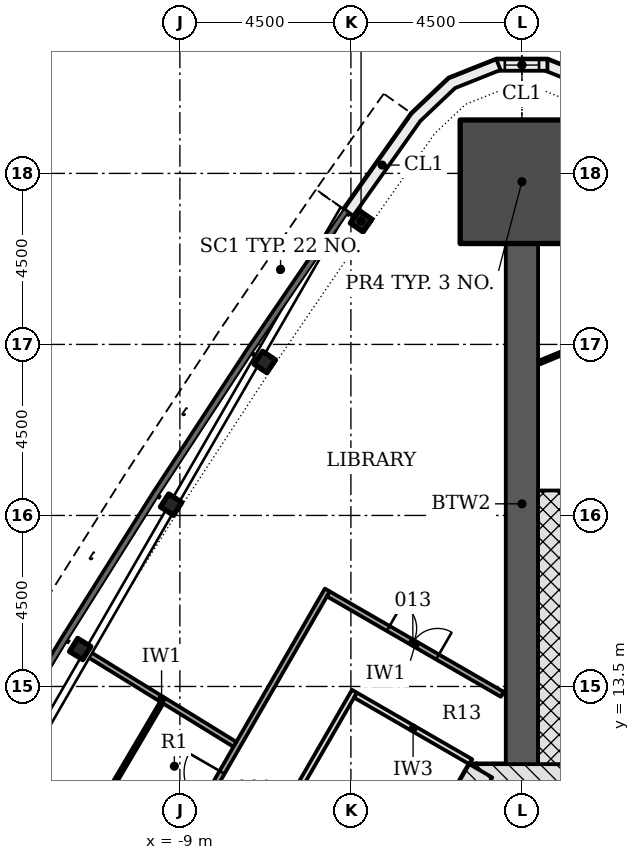
"""IFC4 building model, lengths in metres.
Left out: names, types, materials, properties, quantities, classifications, styles, units other than length and angle.
Written with IfcOpenShell. Run it as: python <this file> out.ifc"""

import sys

from ifc_helpers import new_model, si_unit, direction, frame, frame_2d, origin, origin_2d, place, context, subcontext, project, spatial, polyline, rectangle, i_section, outline, extrude, element, fill, save


model = new_model("IFC4")
c1 = context("Model", 3, precision=1e-05, world=origin(), true_north=direction((0.0, 1.0)))
c2 = subcontext(c1, "Body", "Model", "MODEL_VIEW")
j1 = project(units=[si_unit("LENGTHUNIT", "METRE"), si_unit("PLANEANGLEUNIT", "RADIAN")], contexts=[c1])
p1 = place(None, origin())
s1 = spatial("IfcSite", under=j1, at=p1, CompositionType="ELEMENT")
p2 = place(p1, origin())
s2 = spatial("IfcBuilding", under=s1, at=p2, CompositionType="ELEMENT")
p3 = place(p2, frame((0.0, 0.0, 58.2)))
s3 = spatial("IfcBuildingStorey", under=s2, at=p3, CompositionType="ELEMENT", Elevation=58.2)
p4 = place(p3, frame((10.311, -4.703, -0.2), z_axis=(0.0, 0.0, 1.0), x_axis=(-0.500001446645, 0.866024568562, 0.0)))
e1 = element("IfcWall", 1, at=p4, inside=s3, PredefinedType="SHEAR", context=c2, shape_type="SweptSolid", body=[
    extrude(rectangle(XDim=18.458, YDim=0.7, at=frame_2d((9.229, 0.0))), origin(), (0.0, 0.0, 1.0), 3.6),
])
p5 = place(p4, frame((7.5, 0.0, 0.2)))
e2 = element("IfcOpeningElement", 2, at=p5, cuts=e1, PredefinedType="OPENING", context=c2, shape_type="SweptSolid", body=[
    extrude(rectangle(XDim=1.0, YDim=2.1, at=frame_2d((0.5, 1.05))), frame((0.0, 0.36, 0.0), z_axis=(0.0, -1.0, 0.0), x_axis=(1.0, 0.0, 0.0)), (0.0, 0.0, 1.0), 0.72),
])
p6 = place(p4, frame((1.852, 0.0, 0.2)))
e3 = element("IfcOpeningElement", 3, at=p6, cuts=e1, PredefinedType="OPENING", context=c2, shape_type="SweptSolid", body=[
    extrude(rectangle(XDim=0.9, YDim=2.1, at=frame_2d((0.45, 1.05))), frame((0.0, 0.36, 0.0), z_axis=(0.0, -1.0, 0.0), x_axis=(1.0, 0.0, 0.0)), (0.0, 0.0, 1.0), 0.72),
])
p7 = place(p4, frame((5.238, 0.0, 0.2)))
e4 = element("IfcOpeningElement", 4, at=p7, cuts=e1, PredefinedType="OPENING", context=c2, shape_type="SweptSolid", body=[
    extrude(rectangle(XDim=1.0, YDim=2.1, at=frame_2d((0.5, 1.05))), frame((0.0, 0.36, 0.0), z_axis=(0.0, -1.0, 0.0), x_axis=(1.0, 0.0, 0.0)), (0.0, 0.0, 1.0), 0.72),
])
p8 = place(p4, frame((13.63, 0.0, 0.2)))
e5 = element("IfcOpeningElement", 5, at=p8, cuts=e1, PredefinedType="OPENING", context=c2, shape_type="SweptSolid", body=[
    extrude(rectangle(XDim=0.9, YDim=2.1, at=frame_2d((0.45, 1.05))), frame((0.0, 0.36, 0.0), z_axis=(0.0, -1.0, 0.0), x_axis=(1.0, 0.0, 0.0)), (0.0, 0.0, 1.0), 0.72),
])
p9 = place(p3, frame((1.386, 11.106, -0.2), z_axis=(0.0, 0.0, 1.0), x_axis=(-1.0, 0.0, 0.0)))
e6 = element("IfcWall", 6, at=p9, inside=s3, PredefinedType="SHEAR", context=c2, shape_type="SweptSolid", body=[
    extrude(rectangle(XDim=2.771, YDim=0.7, at=frame_2d((1.386, 0.0))), origin(), (0.0, 0.0, 1.0), 3.6),
])
p10 = place(p3, frame((-1.083, 11.281, -0.2), z_axis=(0.0, 0.0, 1.0), x_axis=(-0.500001446645, -0.866024568562, 0.0)))
e7 = element("IfcWall", 7, at=p10, inside=s3, PredefinedType="SHEAR", context=c2, shape_type="SweptSolid", body=[
    extrude(rectangle(XDim=18.458, YDim=0.7, at=frame_2d((9.229, 0.0))), origin(), (0.0, 0.0, 1.0), 3.6),
])
p11 = place(p10, frame((8.979, 0.0, 0.2)))
e8 = element("IfcOpeningElement", 8, at=p11, cuts=e7, PredefinedType="OPENING", context=c2, shape_type="SweptSolid", body=[
    extrude(rectangle(XDim=1.2, YDim=2.1, at=frame_2d((0.6, 1.05))), frame((0.0, 0.36, 0.0), z_axis=(0.0, -1.0, 0.0), x_axis=(1.0, 0.0, 0.0)), (0.0, 0.0, 1.0), 0.72),
])
p12 = place(p10, frame((11.029, 0.0, 0.2)))
e9 = element("IfcOpeningElement", 9, at=p12, cuts=e7, PredefinedType="OPENING", context=c2, shape_type="SweptSolid", body=[
    extrude(rectangle(XDim=1.2, YDim=2.1, at=frame_2d((0.6, 1.05))), frame((0.0, 0.36, 0.0), z_axis=(0.0, -1.0, 0.0), x_axis=(1.0, 0.0, 0.0)), (0.0, 0.0, 1.0), 0.72),
])
p13 = place(p3, frame((0.0, 11.456, -0.2), z_axis=(0.0, 0.0, 1.0), x_axis=(0.0, 1.0, 0.0)))
e10 = element("IfcWall", 10, at=p13, inside=s3, PredefinedType="SHEAR", context=c2, shape_type="SweptSolid", body=[
    extrude(rectangle(XDim=13.699, YDim=0.85, at=frame_2d((6.849, 0.0))), origin(), (0.0, 0.0, 1.0), 3.6),
])
p14 = place(p3, frame((0.0, 26.78, -0.2), z_axis=(0.0, 0.0, 1.0), x_axis=(0.0, 1.0, 0.0)))
e11 = element("IfcColumn", 11, at=p14, inside=s3, PredefinedType="COLUMN", context=c2, shape_type="SweptSolid", body=[
    extrude(rectangle(XDim=3.25, YDim=3.25, at=origin_2d()), origin(), (0.0, 0.0, 1.0), 3.6),
])
for number, where, z_axis, x_axis in (
    (12, (-4.233, 25.743, -0.2), (0.0, 0.0, 1.0), (-0.572, -0.82, 0.0)),
    (13, (-6.768, 22.038, -0.2), (0.0, 0.0, 1.0), (-0.557, -0.831, 0.0)),
    (14, (-9.231, 18.285, -0.2), (0.0, 0.0, 1.0), (-0.541, -0.841, 0.0)),
    (15, (-11.623, 14.485, -0.2), (0.0, 0.0, 1.0), (-0.525, -0.851, 0.0)),
):
    element("IfcColumn", number, at=place(p3, frame(where, z_axis=z_axis, x_axis=x_axis)), inside=s3, PredefinedType="COLUMN", context=c2, shape_type="SweptSolid", body=[
        extrude(i_section(OverallWidth=0.404, OverallDepth=0.406, WebThickness=0.027, FlangeThickness=0.044, FilletRadius=0.015, at=origin_2d()), origin(), (0.0, 0.0, 1.0), 3.6),
    ])
p15 = place(p3, origin())
e16 = element("IfcWall", 16, at=p15, inside=s3, PredefinedType="NOTDEFINED", context=c2, shape_type="SweptSolid", body=[
    extrude(outline(polyline([(4.684, 26.058), (2.901, 28.576), (1.924, 29.502), (0.673, 30.001), (0.562, 29.722), (1.759, 29.245), (2.673, 28.379), (4.439, 25.885), (4.684, 26.058)])), origin(), (0.0, 0.0, 1.0), 3.3),
])
p16 = place(p3, frame((-0.671, 29.851, 0.0), z_axis=(0.0, 0.0, 1.0), x_axis=(1.0, 0.0, 0.0)))
e17 = element("IfcWall", 17, at=p16, inside=s3, PredefinedType="NOTDEFINED", context=c2, shape_type="SweptSolid", body=[
    extrude(rectangle(XDim=1.342, YDim=0.3, at=frame_2d((0.671, 0.0))), origin(), (0.0, 0.0, 1.0), 3.3),
])
p17 = place(p16, frame((0.221, 0.0, 0.6)))
e18 = element("IfcOpeningElement", 18, at=p17, cuts=e17, PredefinedType="OPENING", context=c2, shape_type="SweptSolid", body=[
    extrude(rectangle(XDim=0.9, YDim=2.4, at=frame_2d((0.45, 1.2))), frame((0.0, 0.16, 0.0), z_axis=(0.0, -1.0, 0.0), x_axis=(1.0, 0.0, 0.0)), (0.0, 0.0, 1.0), 0.32),
])
p18 = place(p3, origin())
e19 = element("IfcWall", 19, at=p18, inside=s3, PredefinedType="NOTDEFINED", context=c2, shape_type="SweptSolid", body=[
    extrude(outline(polyline([(-0.673, 30.001), (-1.924, 29.502), (-2.901, 28.576), (-4.684, 26.058), (-4.439, 25.885), (-2.673, 28.379), (-1.759, 29.245), (-0.562, 29.722), (-0.673, 30.001)])), origin(), (0.0, 0.0, 1.0), 3.3),
])
p19 = place(p3, frame((1.005, 11.456, -0.2), z_axis=(0.0, 0.0, 1.0), x_axis=(0.0, 1.0, 0.0)))
e20 = element("IfcWall", 20, at=p19, inside=s3, PredefinedType="SHEAR", context=c2, shape_type="SweptSolid", body=[
    extrude(rectangle(XDim=7.2, YDim=1.161, at=frame_2d((3.6, 0.0))), origin(), (0.0, 0.0, 1.0), 3.6),
])
p20 = place(p3, frame((-16.169, -3.099, 0.0), z_axis=(0.0, 0.0, 1.0), x_axis=(0.499999805269, 0.866025516212, 0.0)))
e21 = element("IfcWall", 21, at=p20, inside=s3, PredefinedType="PARTITIONING", context=c2, shape_type="SweptSolid", body=[
    extrude(rectangle(XDim=22.097, YDim=0.15, at=frame_2d((11.049, 0.0))), origin(), (0.0, 0.0, 1.0), 2.778),
])
p21 = place(p20, frame((15.558, 0.0, 0.0)))
e22 = element("IfcOpeningElement", 22, at=p21, cuts=e21, PredefinedType="OPENING", context=c2, shape_type="SweptSolid", body=[
    extrude(rectangle(XDim=1.0, YDim=2.1, at=frame_2d((0.5, 1.05))), frame((0.0, 0.085, 0.0), z_axis=(0.0, -1.0, 0.0), x_axis=(1.0, 0.0, 0.0)), (0.0, 0.0, 1.0), 0.17),
])
p22 = place(p20, frame((12.976, 0.0, 0.0)))
e23 = element("IfcOpeningElement", 23, at=p22, cuts=e21, PredefinedType="OPENING", context=c2, shape_type="SweptSolid", body=[
    extrude(rectangle(XDim=1.0, YDim=2.1, at=frame_2d((0.5, 1.05))), frame((0.0, 0.085, 0.0), z_axis=(0.0, -1.0, 0.0), x_axis=(1.0, 0.0, 0.0)), (0.0, 0.0, 1.0), 0.17),
])
p23 = place(p20, frame((9.635, 0.0, 0.0)))
e24 = element("IfcOpeningElement", 24, at=p23, cuts=e21, PredefinedType="OPENING", context=c2, shape_type="SweptSolid", body=[
    extrude(rectangle(XDim=1.5, YDim=2.1, at=frame_2d((0.75, 1.05))), frame((0.0, 0.085, 0.0), z_axis=(0.0, -1.0, 0.0), x_axis=(1.0, 0.0, 0.0)), (0.0, 0.0, 1.0), 0.17),
])
p24 = place(p20, frame((3.404, 0.0, 0.0)))
e25 = element("IfcOpeningElement", 25, at=p24, cuts=e21, PredefinedType="OPENING", context=c2, shape_type="SweptSolid", body=[
    extrude(rectangle(XDim=1.5, YDim=2.1, at=frame_2d((0.75, 1.05))), frame((0.0, 0.085, 0.0), z_axis=(0.0, -1.0, 0.0), x_axis=(1.0, 0.0, 0.0)), (0.0, 0.0, 1.0), 0.17),
])
p25 = place(p3, frame((-4.407, 13.374, 0.0), z_axis=(0.0, 0.0, 1.0), x_axis=(-0.499997181693, -0.866027030928, 0.0)))
e26 = element("IfcWall", 26, at=p25, inside=s3, PredefinedType="PARTITIONING", context=c2, shape_type="SweptSolid", body=[
    extrude(rectangle(XDim=16.77, YDim=0.15, at=frame_2d((8.385, 0.0))), origin(), (0.0, 0.0, 1.0), 2.778),
])
p26 = place(p25, frame((8.879, 0.0, 0.0)))
e27 = element("IfcOpeningElement", 27, at=p26, cuts=e26, PredefinedType="OPENING", context=c2, shape_type="SweptSolid", body=[
    extrude(rectangle(XDim=1.0, YDim=2.1, at=frame_2d((0.5, 1.05))), frame((0.0, 0.085, 0.0), z_axis=(0.0, -1.0, 0.0), x_axis=(1.0, 0.0, 0.0)), (0.0, 0.0, 1.0), 0.17),
])
p27 = place(p3, frame((-5.093, 15.935, 0.0), z_axis=(0.0, 0.0, 1.0), x_axis=(0.866033195618, -0.499986503906, 0.0)))
e28 = element("IfcWall", 28, at=p27, inside=s3, PredefinedType="PARTITIONING", context=c2, shape_type="SweptSolid", body=[
    extrude(rectangle(XDim=5.282, YDim=0.15, at=frame_2d((2.641, 0.0))), origin(), (0.0, 0.0, 1.0), 3.4),
])
p28 = place(p27, frame((1.816, 0.0, 0.0)))
e29 = element("IfcOpeningElement", 29, at=p28, cuts=e28, PredefinedType="OPENING", context=c2, shape_type="SweptSolid", body=[
    extrude(rectangle(XDim=1.5, YDim=2.1, at=frame_2d((0.75, 1.05))), frame((0.0, 0.085, 0.0), z_axis=(0.0, -1.0, 0.0), x_axis=(1.0, 0.0, 0.0)), (0.0, 0.0, 1.0), 0.17),
])
p29 = place(p3, frame((-4.379, 13.271, 0.0), z_axis=(0.0, 0.0, 1.0), x_axis=(0.866019471182, -0.500010275428, 0.0)))
e30 = element("IfcWall", 30, at=p29, inside=s3, PredefinedType="PARTITIONING", context=c2, shape_type="SweptSolid", body=[
    extrude(rectangle(XDim=3.5, YDim=0.15, at=frame_2d((1.75, 0.0))), origin(), (0.0, 0.0, 1.0), 3.4),
])
p30 = place(p3, frame((-11.41, 14.354, 0.0), z_axis=(0.0, 0.0, 1.0), x_axis=(0.851336169767, -0.52462055435, 0.0)))
e31 = element("IfcWall", 31, at=p30, inside=s3, PredefinedType="PARTITIONING", context=c2, shape_type="SweptSolid", body=[
    extrude(rectangle(XDim=4.53, YDim=0.15, at=frame_2d((2.265, 0.0))), origin(), (0.0, 0.0, 1.0), 2.778),
])
p31 = place(p3, frame((-9.478, 13.074, 0.0), z_axis=(0.0, 0.0, 1.0), x_axis=(-0.508234581351, -0.86121867741, 0.0)))
e32 = element("IfcWall", 32, at=p31, inside=s3, PredefinedType="PARTITIONING", context=c2, shape_type="SweptSolid", body=[
    extrude(rectangle(XDim=5.155, YDim=0.1, at=frame_2d((2.577, 0.0))), origin(), (0.0, 0.0, 1.0), 2.778),
])
p32 = place(p3, frame((0.444, 22.018, 0.0), z_axis=(0.0, 0.0, 1.0), x_axis=(0.924087236974, 0.382181604032, 0.0)))
e33 = element("IfcWall", 33, at=p32, inside=s3, PredefinedType="PARTITIONING", context=c2, shape_type="SweptSolid", body=[
    extrude(rectangle(XDim=5.744, YDim=0.1, at=frame_2d((2.872, 0.0))), origin(), (0.0, 0.0, 1.0), 2.974),
])
p33 = place(p32, frame((2.035, 0.0, 0.0)))
e34 = element("IfcOpeningElement", 34, at=p33, cuts=e33, PredefinedType="OPENING", context=c2, shape_type="SweptSolid", body=[
    extrude(rectangle(XDim=1.0, YDim=2.1, at=frame_2d((0.5, 1.05))), frame((0.0, 0.06, 0.0), z_axis=(0.0, -1.0, 0.0), x_axis=(1.0, 0.0, 0.0)), (0.0, 0.0, 1.0), 0.12),
])
p34 = place(p17, origin())
e35 = element("IfcWindow", 35, at=p34, inside=s3, PartitioningType="SINGLE_PANEL", PredefinedType="WINDOW", context=c2, shape_type="SweptSolid", body=[
    extrude(rectangle(XDim=0.9, YDim=2.4, at=frame_2d((0.45, 1.2))), frame((0.0, 0.03, 0.0), z_axis=(0.0, -1.0, 0.0), x_axis=(1.0, 0.0, 0.0)), (0.0, 0.0, 1.0), 0.06),
])
fill(e18, e35)
p35 = place(p21, origin())
e36 = element("IfcDoor", 36, at=p35, inside=s3, OperationType="SINGLE_SWING_RIGHT", PredefinedType="DOOR", context=c2, shape_type="SweptSolid", body=[
    extrude(rectangle(XDim=1.0, YDim=2.1, at=frame_2d((0.5, 1.05))), frame((0.0, 0.025, 0.0), z_axis=(0.0, -1.0, 0.0), x_axis=(1.0, 0.0, 0.0)), (0.0, 0.0, 1.0), 0.05),
])
fill(e22, e36)
p36 = place(p28, origin())
e37 = element("IfcDoor", 37, at=p36, inside=s3, OperationType="DOUBLE_DOOR_SINGLE_SWING", PredefinedType="DOOR", context=c2, shape_type="SweptSolid", body=[
    extrude(rectangle(XDim=1.5, YDim=2.1, at=frame_2d((0.75, 1.05))), frame((0.0, 0.025, 0.0), z_axis=(0.0, -1.0, 0.0), x_axis=(1.0, 0.0, 0.0)), (0.0, 0.0, 1.0), 0.05),
])
fill(e29, e37)
save(model, sys.argv[1])
